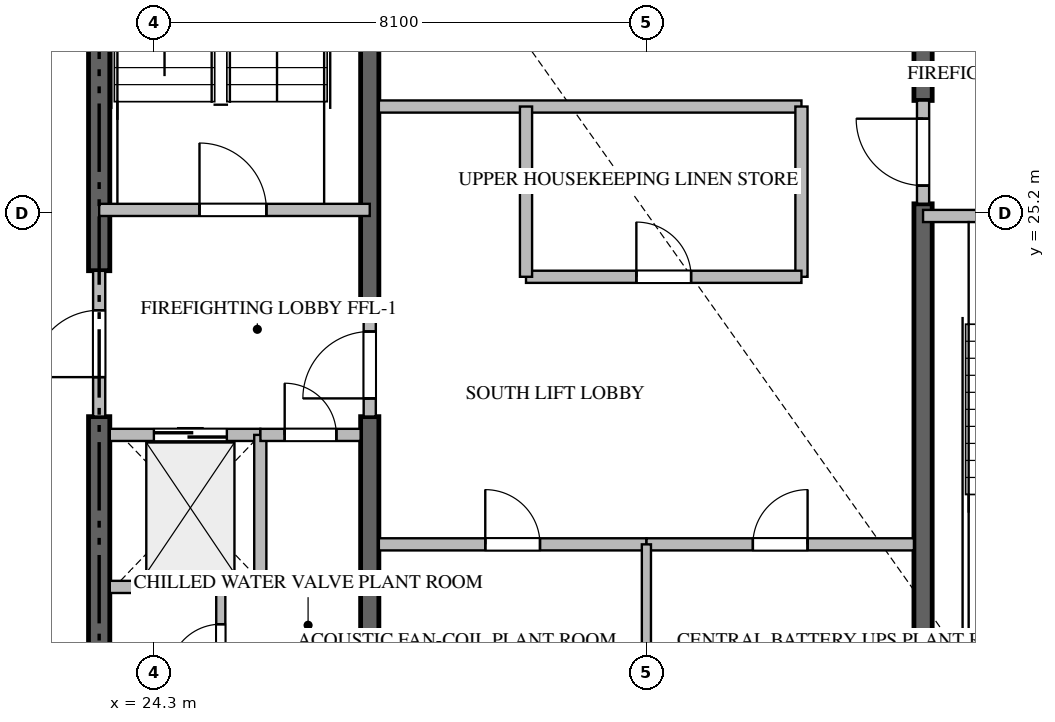
"""IFC4 building model, lengths in metres.
Left out: names, types, materials, properties, quantities, classifications, styles, units other than length and angle.
Written with IfcOpenShell. Run it as: python <this file> out.ifc"""

import sys

from ifc_helpers import new_model, si_unit, direction, frame, frame_2d, origin, place, context, subcontext, project, spatial, rectangle, extrude, source, transform, mapped, element, fill, save


model = new_model("IFC4")
c1 = context("Model", 3, precision=1e-05, world=origin(), true_north=direction((0.0, 1.0)))
c2 = subcontext(c1, "Body", "Model", "MODEL_VIEW")
j1 = project(units=[si_unit("LENGTHUNIT", "METRE"), si_unit("PLANEANGLEUNIT", "RADIAN")], contexts=[c1])
p1 = place(None, origin())
s1 = spatial("IfcSite", under=j1, at=p1, CompositionType="ELEMENT")
p2 = place(p1, origin())
s2 = spatial("IfcBuilding", under=s1, at=p2, CompositionType="ELEMENT")
p3 = place(p2, frame((0.0, 0.0, 237.4)))
s3 = spatial("IfcBuildingStorey", under=s2, at=p3, CompositionType="ELEMENT", Elevation=237.4)
p4 = place(p3, frame((23.4, 16.975, -0.26), z_axis=(0.0, 0.0, 1.0), x_axis=(0.0, 1.0, 0.0)))
e1 = element("IfcWall", 1, at=p4, inside=s3, PredefinedType="SHEAR", context=c2, shape_type="SweptSolid", body=[
    extrude(rectangle(XDim=4.875, YDim=0.35, at=frame_2d((2.438, 0.0))), origin(), (0.0, 0.0, 1.0), 3.848),
])
p5 = place(p3, frame((23.4, 24.25, -0.26), z_axis=(0.0, 0.0, 1.0), x_axis=(0.0, 1.0, 0.0)))
e2 = element("IfcWall", 2, at=p5, inside=s3, PredefinedType="SHEAR", context=c2, shape_type="SweptSolid", body=[
    extrude(rectangle(XDim=9.175, YDim=0.35, at=frame_2d((4.587, 0.0))), origin(), (0.0, 0.0, 1.0), 3.848),
])
p6 = place(p3, frame((27.85, 16.975, -0.26), z_axis=(0.0, 0.0, 1.0), x_axis=(0.0, 1.0, 0.0)))
e3 = element("IfcWall", 3, at=p6, inside=s3, PredefinedType="SHEAR", context=c2, shape_type="SweptSolid", body=[
    extrude(rectangle(XDim=4.875, YDim=0.3, at=frame_2d((2.438, 0.0))), origin(), (0.0, 0.0, 1.0), 3.848),
])
p7 = place(p3, frame((27.85, 23.55, -0.26), z_axis=(0.0, 0.0, 1.0), x_axis=(0.0, 1.0, 0.0)))
e4 = element("IfcWall", 4, at=p7, inside=s3, PredefinedType="SHEAR", context=c2, shape_type="SweptSolid", body=[
    extrude(rectangle(XDim=9.875, YDim=0.3, at=frame_2d((4.938, 0.0))), origin(), (0.0, 0.0, 1.0), 3.848),
])
p8 = place(p3, frame((36.95, 16.975, -0.26), z_axis=(0.0, 0.0, 1.0), x_axis=(0.0, 1.0, 0.0)))
e5 = element("IfcWall", 5, at=p8, inside=s3, PredefinedType="SHEAR", context=c2, shape_type="SweptSolid", body=[
    extrude(rectangle(XDim=8.375, YDim=0.3, at=frame_2d((4.188, 0.0))), origin(), (0.0, 0.0, 1.0), 3.848),
])
p9 = place(p3, frame((36.95, 27.05, -0.26), z_axis=(0.0, 0.0, 1.0), x_axis=(0.0, 1.0, 0.0)))
e6 = element("IfcWall", 6, at=p9, inside=s3, PredefinedType="SHEAR", context=c2, shape_type="SweptSolid", body=[
    extrude(rectangle(XDim=6.375, YDim=0.3, at=frame_2d((3.188, 0.0))), origin(), (0.0, 0.0, 1.0), 3.848),
])
p10 = place(p3, frame((23.4, 25.25, 0.0), z_axis=(0.0, 0.0, 1.0), x_axis=(1.0, 0.0, 0.0)))
e7 = element("IfcWall", 7, at=p10, inside=s3, PredefinedType="STANDARD", context=c2, shape_type="SweptSolid", body=[
    extrude(rectangle(XDim=4.45, YDim=0.2, at=frame_2d((2.225, 0.0))), origin(), (0.0, 0.0, 1.0), 3.59),
])
p11 = place(p10, frame((1.65, 0.0, 0.0)))
e8 = element("IfcOpeningElement", 8, at=p11, cuts=e7, PredefinedType="OPENING", context=c2, shape_type="SweptSolid", body=[
    extrude(rectangle(XDim=1.1, YDim=2.15, at=frame_2d((0.55, 1.075))), frame((0.0, 0.11, 0.0), z_axis=(0.0, -1.0, 0.0), x_axis=(1.0, 0.0, 0.0)), (0.0, 0.0, 1.0), 0.22),
])
p12 = place(p3, frame((36.95, 25.15, 0.0), z_axis=(0.0, 0.0, 1.0), x_axis=(1.0, 0.0, 0.0)))
e9 = element("IfcWall", 9, at=p12, inside=s3, PredefinedType="STANDARD", context=c2, shape_type="SweptSolid", body=[
    extrude(rectangle(XDim=4.45, YDim=0.2, at=frame_2d((2.225, 0.0))), origin(), (0.0, 0.0, 1.0), 3.59),
])
p13 = place(p12, frame((1.65, 0.0, 0.0)))
e10 = element("IfcOpeningElement", 10, at=p13, cuts=e9, PredefinedType="OPENING", context=c2, shape_type="SweptSolid", body=[
    extrude(rectangle(XDim=1.1, YDim=2.15, at=frame_2d((0.55, 1.075))), frame((0.0, 0.11, 0.0), z_axis=(0.0, -1.0, 0.0), x_axis=(1.0, 0.0, 0.0)), (0.0, 0.0, 1.0), 0.22),
])
p14 = place(p3, frame((23.575, 21.55, 0.0), z_axis=(0.0, 0.0, 1.0), x_axis=(1.0, 0.0, 0.0)))
e11 = element("IfcWall", 11, at=p14, inside=s3, PredefinedType="STANDARD", context=c2, shape_type="SweptSolid", body=[
    extrude(rectangle(XDim=2.475, YDim=0.2, at=frame_2d((1.238, 0.0))), origin(), (0.0, 0.0, 1.0), 3.59),
])
p15 = place(p14, frame((0.725, 0.0, 0.0)))
e12 = element("IfcOpeningElement", 12, at=p15, cuts=e11, PredefinedType="OPENING", context=c2, shape_type="SweptSolid", body=[
    extrude(rectangle(XDim=1.2, YDim=2.2, at=frame_2d((0.6, 1.1))), frame((0.0, 0.11, 0.0), z_axis=(0.0, -1.0, 0.0), x_axis=(1.0, 0.0, 0.0)), (0.0, 0.0, 1.0), 0.22),
])
p16 = place(p3, frame((26.05, 19.05, 0.0), z_axis=(0.0, 0.0, 1.0), x_axis=(0.0, 1.0, 0.0)))
e13 = element("IfcWall", 13, at=p16, inside=s3, PredefinedType="STANDARD", context=c2, shape_type="SweptSolid", body=[
    extrude(rectangle(XDim=2.5, YDim=0.2, at=frame_2d((1.25, 0.0))), origin(), (0.0, 0.0, 1.0), 3.59),
])
p17 = place(p3, frame((23.575, 19.05, 0.0), z_axis=(0.0, 0.0, 1.0), x_axis=(1.0, 0.0, 0.0)))
e14 = element("IfcWall", 14, at=p17, inside=s3, PredefinedType="STANDARD", context=c2, shape_type="SweptSolid", body=[
    extrude(rectangle(XDim=2.475, YDim=0.2, at=frame_2d((1.238, 0.0))), origin(), (0.0, 0.0, 1.0), 3.59),
])
p18 = place(p3, frame((26.052, 21.55, 0.0), z_axis=(0.0, 0.0, 1.0), x_axis=(1.0, 0.0, 0.0)))
e15 = element("IfcWall", 15, at=p18, inside=s3, PredefinedType="STANDARD", context=c2, shape_type="SweptSolid", body=[
    extrude(rectangle(XDim=1.648, YDim=0.2, at=frame_2d((0.824, 0.0))), origin(), (0.0, 0.0, 1.0), 3.59),
])
p19 = place(p18, frame((0.399, 0.0, 0.0)))
e16 = element("IfcOpeningElement", 16, at=p19, cuts=e15, PredefinedType="OPENING", context=c2, shape_type="SweptSolid", body=[
    extrude(rectangle(XDim=0.85, YDim=2.1, at=frame_2d((0.425, 1.05))), frame((0.0, 0.11, 0.0), z_axis=(0.0, -1.0, 0.0), x_axis=(1.0, 0.0, 0.0)), (0.0, 0.0, 1.0), 0.22),
])
p20 = place(p3, frame((23.4, 21.852, 0.0), z_axis=(0.0, 0.0, 1.0), x_axis=(0.0, 1.0, 0.0)))
e17 = element("IfcWall", 17, at=p20, inside=s3, PredefinedType="STANDARD", context=c2, shape_type="SweptSolid", body=[
    extrude(rectangle(XDim=2.396, YDim=0.2, at=frame_2d((1.198, 0.0))), origin(), (0.0, 0.0, 1.0), 3.59),
])
p21 = place(p20, frame((0.648, 0.0, 0.0)))
e18 = element("IfcOpeningElement", 18, at=p21, cuts=e17, PredefinedType="OPENING", context=c2, shape_type="SweptSolid", body=[
    extrude(rectangle(XDim=1.1, YDim=2.15, at=frame_2d((0.55, 1.075))), frame((0.0, 0.11, 0.0), z_axis=(0.0, -1.0, 0.0), x_axis=(1.0, 0.0, 0.0)), (0.0, 0.0, 1.0), 0.22),
])
p22 = place(p3, frame((27.85, 21.852, 0.0), z_axis=(0.0, 0.0, 1.0), x_axis=(0.0, 1.0, 0.0)))
e19 = element("IfcWall", 19, at=p22, inside=s3, PredefinedType="STANDARD", context=c2, shape_type="SweptSolid", body=[
    extrude(rectangle(XDim=1.696, YDim=0.2, at=frame_2d((0.848, 0.0))), origin(), (0.0, 0.0, 1.0), 3.59),
])
p23 = place(p22, frame((0.298, 0.0, 0.0)))
e20 = element("IfcOpeningElement", 20, at=p23, cuts=e19, PredefinedType="OPENING", context=c2, shape_type="SweptSolid", body=[
    extrude(rectangle(XDim=1.1, YDim=2.15, at=frame_2d((0.55, 1.075))), frame((0.0, 0.11, 0.0), z_axis=(0.0, -1.0, 0.0), x_axis=(1.0, 0.0, 0.0)), (0.0, 0.0, 1.0), 0.22),
])
p24 = place(p3, frame((36.95, 25.352, 0.0), z_axis=(0.0, 0.0, 1.0), x_axis=(0.0, 1.0, 0.0)))
e21 = element("IfcWall", 21, at=p24, inside=s3, PredefinedType="STANDARD", context=c2, shape_type="SweptSolid", body=[
    extrude(rectangle(XDim=1.696, YDim=0.2, at=frame_2d((0.848, 0.0))), origin(), (0.0, 0.0, 1.0), 3.59),
])
p25 = place(p24, frame((0.298, 0.0, 0.0)))
e22 = element("IfcOpeningElement", 22, at=p25, cuts=e21, PredefinedType="OPENING", context=c2, shape_type="SweptSolid", body=[
    extrude(rectangle(XDim=1.1, YDim=2.15, at=frame_2d((0.55, 1.075))), frame((0.0, 0.11, 0.0), z_axis=(0.0, -1.0, 0.0), x_axis=(1.0, 0.0, 0.0)), (0.0, 0.0, 1.0), 0.22),
])
p26 = place(p3, frame((25.4, 16.975, 0.0), z_axis=(0.0, 0.0, 1.0), x_axis=(0.0, 1.0, 0.0)))
e23 = element("IfcWall", 23, at=p26, inside=s3, PredefinedType="PARTITIONING", context=c2, shape_type="SweptSolid", body=[
    extrude(rectangle(XDim=2.075, YDim=0.15, at=frame_2d((1.038, 0.0))), origin(), (0.0, 0.0, 1.0), 3.59),
])
p27 = place(p26, frame((0.612, 0.0, 0.0)))
e24 = element("IfcOpeningElement", 24, at=p27, cuts=e23, PredefinedType="OPENING", context=c2, shape_type="SweptSolid", body=[
    extrude(rectangle(XDim=0.85, YDim=2.1, at=frame_2d((0.425, 1.05))), frame((0.0, 0.085, 0.0), z_axis=(0.0, -1.0, 0.0), x_axis=(1.0, 0.0, 0.0)), (0.0, 0.0, 1.0), 0.17),
])
p28 = place(p3, frame((28.0, 19.75, 0.0), z_axis=(0.0, 0.0, 1.0), x_axis=(1.0, 0.0, 0.0)))
e25 = element("IfcWall", 25, at=p28, inside=s3, PredefinedType="STANDARD", context=c2, shape_type="SweptSolid", body=[
    extrude(rectangle(XDim=4.4, YDim=0.2, at=frame_2d((2.2, 0.0))), origin(), (0.0, 0.0, 1.0), 3.59),
])
p29 = place(p28, frame((1.75, 0.0, 0.0)))
e26 = element("IfcOpeningElement", 26, at=p29, cuts=e25, PredefinedType="OPENING", context=c2, shape_type="SweptSolid", body=[
    extrude(rectangle(XDim=0.9, YDim=2.1, at=frame_2d((0.45, 1.05))), frame((0.0, 0.11, 0.0), z_axis=(0.0, -1.0, 0.0), x_axis=(1.0, 0.0, 0.0)), (0.0, 0.0, 1.0), 0.22),
])
p30 = place(p3, frame((32.402, 19.75, 0.0), z_axis=(0.0, 0.0, 1.0), x_axis=(1.0, 0.0, 0.0)))
e27 = element("IfcWall", 27, at=p30, inside=s3, PredefinedType="STANDARD", context=c2, shape_type="SweptSolid", body=[
    extrude(rectangle(XDim=4.398, YDim=0.2, at=frame_2d((2.199, 0.0))), origin(), (0.0, 0.0, 1.0), 3.59),
])
p31 = place(p30, frame((1.749, 0.0, 0.0)))
e28 = element("IfcOpeningElement", 28, at=p31, cuts=e27, PredefinedType="OPENING", context=c2, shape_type="SweptSolid", body=[
    extrude(rectangle(XDim=0.9, YDim=2.1, at=frame_2d((0.45, 1.05))), frame((0.0, 0.11, 0.0), z_axis=(0.0, -1.0, 0.0), x_axis=(1.0, 0.0, 0.0)), (0.0, 0.0, 1.0), 0.22),
])
p32 = place(p3, frame((32.4, 17.02, 0.0), z_axis=(0.0, 0.0, 1.0), x_axis=(0.0, 1.0, 0.0)))
e29 = element("IfcWall", 29, at=p32, inside=s3, PredefinedType="PARTITIONING", context=c2, shape_type="SweptSolid", body=[
    extrude(rectangle(XDim=2.73, YDim=0.15, at=frame_2d((1.365, 0.0))), origin(), (0.0, 0.0, 1.0), 3.59),
])
p33 = place(p3, frame((28.0, 26.95, 0.0), z_axis=(0.0, 0.0, 1.0), x_axis=(1.0, 0.0, 0.0)))
e30 = element("IfcWall", 30, at=p33, inside=s3, PredefinedType="STANDARD", context=c2, shape_type="SweptSolid", body=[
    extrude(rectangle(XDim=6.95, YDim=0.2, at=frame_2d((3.475, 0.0))), origin(), (0.0, 0.0, 1.0), 3.59),
])
p34 = place(p3, frame((34.95, 24.15, 0.0), z_axis=(0.0, 0.0, 1.0), x_axis=(0.0, 1.0, 0.0)))
e31 = element("IfcWall", 31, at=p34, inside=s3, PredefinedType="STANDARD", context=c2, shape_type="SweptSolid", body=[
    extrude(rectangle(XDim=2.8, YDim=0.2, at=frame_2d((1.4, 0.0))), origin(), (0.0, 0.0, 1.0), 3.59),
])
p35 = place(p3, frame((30.42, 24.15, 0.0), z_axis=(0.0, 0.0, 1.0), x_axis=(1.0, 0.0, 0.0)))
e32 = element("IfcWall", 32, at=p35, inside=s3, PredefinedType="STANDARD", context=c2, shape_type="SweptSolid", body=[
    extrude(rectangle(XDim=4.53, YDim=0.2, at=frame_2d((2.265, 0.0))), origin(), (0.0, 0.0, 1.0), 3.59),
])
p36 = place(p35, frame((1.815, 0.0, 0.0)))
e33 = element("IfcOpeningElement", 33, at=p36, cuts=e32, PredefinedType="OPENING", context=c2, shape_type="SweptSolid", body=[
    extrude(rectangle(XDim=0.9, YDim=2.1, at=frame_2d((0.45, 1.05))), frame((0.0, 0.11, 0.0), z_axis=(0.0, -1.0, 0.0), x_axis=(1.0, 0.0, 0.0)), (0.0, 0.0, 1.0), 0.22),
])
p37 = place(p3, frame((30.42, 24.15, 0.0), z_axis=(0.0, 0.0, 1.0), x_axis=(0.0, 1.0, 0.0)))
e34 = element("IfcWall", 34, at=p37, inside=s3, PredefinedType="STANDARD", context=c2, shape_type="SweptSolid", body=[
    extrude(rectangle(XDim=2.8, YDim=0.2, at=frame_2d((1.4, 0.0))), origin(), (0.0, 0.0, 1.0), 3.59),
])
m1 = source(origin(), c2, "Body", "SweptSolid", [
    extrude(rectangle(XDim=1.1, YDim=2.15, at=frame_2d((0.55, 1.075))), frame((0.0, 0.025, 0.0), z_axis=(0.0, -1.0, 0.0), x_axis=(1.0, 0.0, 0.0)), (0.0, 0.0, 1.0), 0.05),
])
p38 = place(p11, origin())
e35 = element("IfcDoor", 35, at=p38, inside=s3, OperationType="SINGLE_SWING_LEFT", PredefinedType="DOOR", context=c2, shape_type="MappedRepresentation", body=[
    mapped(m1, transform((0.0, 0.0, 0.0), scale=1.0)),
])
fill(e8, e35)
m2 = source(origin(), c2, "Body", "SweptSolid", [
    extrude(rectangle(XDim=1.2, YDim=2.2, at=frame_2d((0.6, 1.1))), frame((0.0, 0.025, 0.0), z_axis=(0.0, -1.0, 0.0), x_axis=(1.0, 0.0, 0.0)), (0.0, 0.0, 1.0), 0.05),
])
p39 = place(p15, origin())
e36 = element("IfcDoor", 36, at=p39, inside=s3, OperationType="DOUBLE_DOOR_SLIDING", PredefinedType="DOOR", context=c2, shape_type="MappedRepresentation", body=[
    mapped(m2, transform((0.0, 0.0, 0.0), scale=1.0)),
])
fill(e12, e36)
m3 = source(origin(), c2, "Body", "SweptSolid", [
    extrude(rectangle(XDim=0.85, YDim=2.1, at=frame_2d((0.425, 1.05))), frame((0.0, 0.025, 0.0), z_axis=(0.0, -1.0, 0.0), x_axis=(1.0, 0.0, 0.0)), (0.0, 0.0, 1.0), 0.05),
])
p40 = place(p19, origin())
e37 = element("IfcDoor", 37, at=p40, inside=s3, OperationType="SINGLE_SWING_LEFT", PredefinedType="DOOR", context=c2, shape_type="MappedRepresentation", body=[
    mapped(m3, transform((0.0, 0.0, 0.0), scale=1.0)),
])
fill(e16, e37)
p41 = place(p21, origin())
e38 = element("IfcDoor", 38, at=p41, inside=s3, OperationType="SINGLE_SWING_LEFT", PredefinedType="DOOR", context=c2, shape_type="MappedRepresentation", body=[
    mapped(m1, transform((0.0, 0.0, 0.0), scale=1.0)),
])
fill(e18, e38)
p42 = place(p23, origin())
e39 = element("IfcDoor", 39, at=p42, inside=s3, OperationType="SINGLE_SWING_LEFT", PredefinedType="DOOR", context=c2, shape_type="MappedRepresentation", body=[
    mapped(m1, transform((0.0, 0.0, 0.0), scale=1.0)),
])
fill(e20, e39)
p43 = place(p25, origin())
e40 = element("IfcDoor", 40, at=p43, inside=s3, OperationType="SINGLE_SWING_RIGHT", PredefinedType="DOOR", context=c2, shape_type="MappedRepresentation", body=[
    mapped(m1, transform((0.0, 0.0, 0.0), scale=1.0)),
])
fill(e22, e40)
p44 = place(p27, origin())
e41 = element("IfcDoor", 41, at=p44, inside=s3, OperationType="SINGLE_SWING_LEFT", PredefinedType="DOOR", context=c2, shape_type="MappedRepresentation", body=[
    mapped(m3, transform((0.0, 0.0, 0.0), scale=1.0)),
])
fill(e24, e41)
m4 = source(origin(), c2, "Body", "SweptSolid", [
    extrude(rectangle(XDim=0.9, YDim=2.1, at=frame_2d((0.45, 1.05))), frame((0.0, 0.025, 0.0), z_axis=(0.0, -1.0, 0.0), x_axis=(1.0, 0.0, 0.0)), (0.0, 0.0, 1.0), 0.05),
])
p45 = place(p29, origin())
e42 = element("IfcDoor", 42, at=p45, inside=s3, OperationType="SINGLE_SWING_LEFT", PredefinedType="DOOR", context=c2, shape_type="MappedRepresentation", body=[
    mapped(m4, transform((0.0, 0.0, 0.0), scale=1.0)),
])
fill(e26, e42)
p46 = place(p31, origin())
e43 = element("IfcDoor", 43, at=p46, inside=s3, OperationType="SINGLE_SWING_RIGHT", PredefinedType="DOOR", context=c2, shape_type="MappedRepresentation", body=[
    mapped(m4, transform((0.0, 0.0, 0.0), scale=1.0)),
])
fill(e28, e43)
p47 = place(p36, origin())
e44 = element("IfcDoor", 44, at=p47, inside=s3, OperationType="SINGLE_SWING_LEFT", PredefinedType="DOOR", context=c2, shape_type="MappedRepresentation", body=[
    mapped(m4, transform((0.0, 0.0, 0.0), scale=1.0)),
])
fill(e33, e44)
save(model, sys.argv[1])
